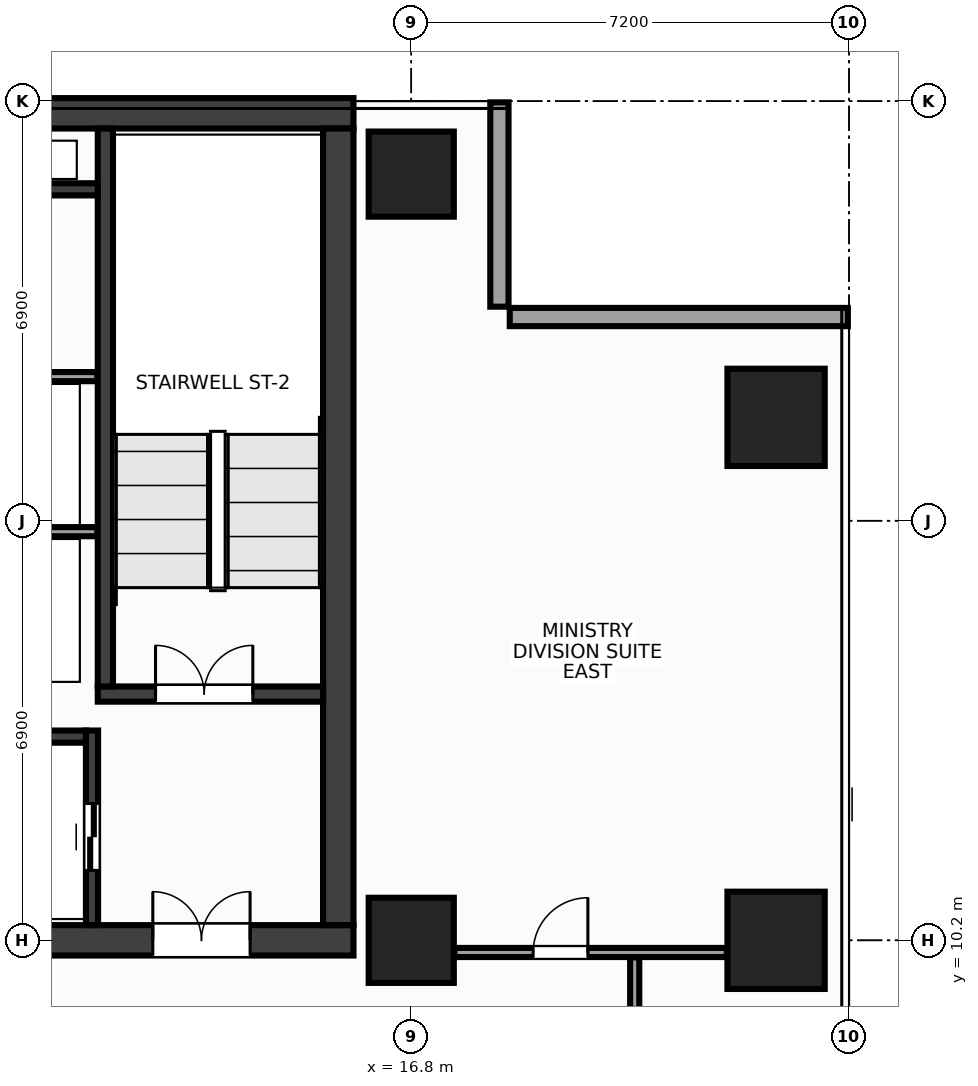
"""IFC4 building model, lengths in metres.
Left out: names, types, materials, properties, quantities, classifications, styles, units other than length and angle.
Written with IfcOpenShell. Run it as: python <this file> out.ifc"""

import sys

from ifc_helpers import new_model, si_unit, direction, frame, frame_2d, origin, origin_2d, place, context, subcontext, project, spatial, rectangle, extrude, source, transform, mapped, element, fill, save


model = new_model("IFC4")
c1 = context("Model", 3, precision=1e-05, world=origin(), true_north=direction((0.0, 1.0)))
c2 = subcontext(c1, "Body", "Model", "MODEL_VIEW")
j1 = project(units=[si_unit("LENGTHUNIT", "METRE"), si_unit("PLANEANGLEUNIT", "RADIAN")], contexts=[c1])
p1 = place(None, origin())
s1 = spatial("IfcSite", under=j1, at=p1, CompositionType="ELEMENT")
p2 = place(p1, origin())
s2 = spatial("IfcBuilding", under=s1, at=p2, CompositionType="ELEMENT")
p3 = place(p2, frame((0.0, 0.0, 214.4)))
s3 = spatial("IfcBuildingStorey", under=s2, at=p3, CompositionType="ELEMENT", Elevation=214.4)
m1 = source(origin(), c2, "Body", "SweptSolid", [
    extrude(rectangle(XDim=31.7, YDim=0.5, at=frame_2d((15.85, 0.0))), origin(), (0.0, 0.0, 1.0), 3.6),
])
p4 = place(p3, frame((-15.85, 23.8, 0.0), z_axis=(0.0, 0.0, 1.0), x_axis=(1.0, 0.0, 0.0)))
e1 = element("IfcWall", 1, at=p4, inside=s3, PredefinedType="SHEAR", context=c2, shape_type="MappedRepresentation", body=[
    mapped(m1, transform((0.0, 0.0, 0.0), x_axis=(1.0, 0.0, 0.0), y_axis=(0.0, 1.0, 0.0), z_axis=(0.0, 0.0, 1.0), scale=1.0)),
])
p5 = place(p3, frame((-15.85, 10.2, 0.0), z_axis=(0.0, 0.0, 1.0), x_axis=(1.0, 0.0, 0.0)))
e2 = element("IfcWall", 2, at=p5, inside=s3, PredefinedType="SHEAR", context=c2, shape_type="MappedRepresentation", body=[
    mapped(m1, transform((0.0, 0.0, 0.0), x_axis=(1.0, 0.0, 0.0), y_axis=(0.0, 1.0, 0.0), z_axis=(0.0, 0.0, 1.0), scale=1.0)),
])
p6 = place(p5, frame((1.7, 0.0, 0.0)))
e3 = element("IfcOpeningElement", 3, at=p6, cuts=e2, PredefinedType="OPENING", context=c2, shape_type="SweptSolid", body=[
    extrude(rectangle(XDim=1.6, YDim=2.15, at=frame_2d((0.8, 1.075))), frame((0.0, 0.262, 0.0), z_axis=(0.0, -1.0, 0.0), x_axis=(1.0, 0.0, 0.0)), (0.0, 0.0, 1.0), 0.524),
])
p7 = place(p5, frame((28.4, 0.0, 0.0)))
e4 = element("IfcOpeningElement", 4, at=p7, cuts=e2, PredefinedType="OPENING", context=c2, shape_type="SweptSolid", body=[
    extrude(rectangle(XDim=1.6, YDim=2.15, at=frame_2d((0.8, 1.075))), frame((0.0, 0.262, 0.0), z_axis=(0.0, -1.0, 0.0), x_axis=(1.0, 0.0, 0.0)), (0.0, 0.0, 1.0), 0.524),
])
p8 = place(p5, frame((15.1, 0.0, 0.0)))
e5 = element("IfcOpeningElement", 5, at=p8, cuts=e2, PredefinedType="OPENING", context=c2, shape_type="SweptSolid", body=[
    extrude(rectangle(XDim=1.5, YDim=2.2, at=frame_2d((0.75, 1.1))), frame((0.0, 0.262, 0.0), z_axis=(0.0, -1.0, 0.0), x_axis=(1.0, 0.0, 0.0)), (0.0, 0.0, 1.0), 0.524),
])
m2 = source(origin(), c2, "Body", "SweptSolid", [
    extrude(rectangle(XDim=13.1, YDim=0.5, at=frame_2d((6.55, 0.0))), origin(), (0.0, 0.0, 1.0), 3.6),
])
p9 = place(p3, frame((15.6, 10.45, 0.0), z_axis=(0.0, 0.0, 1.0), x_axis=(0.0, 1.0, 0.0)))
e6 = element("IfcWall", 6, at=p9, inside=s3, PredefinedType="SHEAR", context=c2, shape_type="MappedRepresentation", body=[
    mapped(m2, transform((0.0, 0.0, 0.0), x_axis=(1.0, 0.0, 0.0), y_axis=(0.0, 1.0, 0.0), z_axis=(0.0, 0.0, 1.0), scale=1.0)),
])
m3 = source(origin(), c2, "Body", "SweptSolid", [
    extrude(rectangle(XDim=3.705, YDim=0.25, at=frame_2d((1.853, 0.0))), origin(), (0.0, 0.0, 1.0), 3.6),
])
p10 = place(p3, frame((11.645, 14.25, 0.0), z_axis=(0.0, 0.0, 1.0), x_axis=(1.0, 0.0, 0.0)))
e7 = element("IfcWall", 7, at=p10, inside=s3, PredefinedType="SHEAR", context=c2, shape_type="MappedRepresentation", body=[
    mapped(m3, transform((0.0, 0.0, 0.0), x_axis=(1.0, 0.0, 0.0), y_axis=(0.0, 1.0, 0.0), z_axis=(0.0, 0.0, 1.0), scale=1.0)),
])
p11 = place(p10, frame((0.95, 0.0, 0.0)))
e8 = element("IfcOpeningElement", 8, at=p11, cuts=e7, PredefinedType="OPENING", context=c2, shape_type="SweptSolid", body=[
    extrude(rectangle(XDim=1.6, YDim=2.15, at=frame_2d((0.8, 1.075))), frame((0.0, 0.137, 0.0), z_axis=(0.0, -1.0, 0.0), x_axis=(1.0, 0.0, 0.0)), (0.0, 0.0, 1.0), 0.274),
])
m4 = source(origin(), c2, "Body", "SweptSolid", [
    extrude(rectangle(XDim=9.175, YDim=0.25, at=frame_2d((4.587, 0.0))), origin(), (0.0, 0.0, 1.0), 3.6),
])
p12 = place(p3, frame((11.77, 14.375, 0.0), z_axis=(0.0, 0.0, 1.0), x_axis=(0.0, 1.0, 0.0)))
e9 = element("IfcWall", 9, at=p12, inside=s3, PredefinedType="SHEAR", context=c2, shape_type="MappedRepresentation", body=[
    mapped(m4, transform((0.0, 0.0, 0.0), x_axis=(1.0, 0.0, 0.0), y_axis=(0.0, 1.0, 0.0), z_axis=(0.0, 0.0, 1.0), scale=1.0)),
])
m5 = source(origin(), c2, "Body", "SweptSolid", [
    extrude(rectangle(XDim=3.2, YDim=0.2, at=frame_2d((1.6, 0.0))), origin(), (0.0, 0.0, 1.0), 3.6),
])
p13 = place(p3, frame((11.55, 10.45, 0.0), z_axis=(0.0, 0.0, 1.0), x_axis=(0.0, 1.0, 0.0)))
e10 = element("IfcWall", 10, at=p13, inside=s3, PredefinedType="SHEAR", context=c2, shape_type="MappedRepresentation", body=[
    mapped(m5, transform((0.0, 0.0, 0.0), x_axis=(1.0, 0.0, 0.0), y_axis=(0.0, 1.0, 0.0), z_axis=(0.0, 0.0, 1.0), scale=1.0)),
])
p14 = place(p13, frame((0.9, 0.0, 0.0)))
e11 = element("IfcOpeningElement", 11, at=p14, cuts=e10, PredefinedType="OPENING", context=c2, shape_type="SweptSolid", body=[
    extrude(rectangle(XDim=1.1, YDim=2.15, at=frame_2d((0.55, 1.075))), frame((0.0, 0.112, 0.0), z_axis=(0.0, -1.0, 0.0), x_axis=(1.0, 0.0, 0.0)), (0.0, 0.0, 1.0), 0.224),
])
m6 = source(origin(), c2, "Body", "SweptSolid", [
    extrude(rectangle(XDim=2.825, YDim=0.2, at=frame_2d((1.413, 0.0))), origin(), (0.0, 0.0, 1.0), 3.6),
])
p15 = place(p3, frame((8.625, 13.55, 0.0), z_axis=(0.0, 0.0, 1.0), x_axis=(1.0, 0.0, 0.0)))
e12 = element("IfcWall", 12, at=p15, inside=s3, PredefinedType="SHEAR", context=c2, shape_type="MappedRepresentation", body=[
    mapped(m6, transform((0.0, 0.0, 0.0), x_axis=(1.0, 0.0, 0.0), y_axis=(0.0, 1.0, 0.0), z_axis=(0.0, 0.0, 1.0), scale=1.0)),
])
m7 = source(origin(), c2, "Body", "SweptSolid", [
    extrude(rectangle(XDim=3.02, YDim=0.2, at=frame_2d((1.51, 0.0))), origin(), (0.0, 0.0, 1.0), 3.6),
])
p16 = place(p3, frame((8.625, 22.55, 0.0), z_axis=(0.0, 0.0, 1.0), x_axis=(1.0, 0.0, 0.0)))
e13 = element("IfcWall", 13, at=p16, inside=s3, PredefinedType="SHEAR", context=c2, shape_type="MappedRepresentation", body=[
    mapped(m7, transform((0.0, 0.0, 0.0), x_axis=(1.0, 0.0, 0.0), y_axis=(0.0, 1.0, 0.0), z_axis=(0.0, 0.0, 1.0), scale=1.0)),
])
m8 = source(origin(), c2, "Body", "SweptSolid", [
    extrude(rectangle(XDim=1.4, YDim=1.4, at=origin_2d()), origin(), (0.0, 0.0, 1.0), 3.6),
])
for number, where, z_axis, x_axis in (
    (14, (16.8, 10.2, 0.0), (0.0, 0.0, 1.0), (1.0, 0.0, 0.0)),
    (15, (16.8, 22.8, 0.0), (0.0, 0.0, 1.0), (1.0, 0.0, 0.0)),
):
    element("IfcColumn", number, at=place(p3, frame(where, z_axis=z_axis, x_axis=x_axis)), inside=s3, PredefinedType="COLUMN", context=c2, shape_type="MappedRepresentation", body=[
        mapped(m8, transform((0.0, 0.0, 0.0), x_axis=(1.0, 0.0, 0.0), y_axis=(0.0, 1.0, 0.0), z_axis=(0.0, 0.0, 1.0), scale=1.0)),
    ])
m9 = source(origin(), c2, "Body", "SweptSolid", [
    extrude(rectangle(XDim=1.6, YDim=1.6, at=origin_2d()), origin(), (0.0, 0.0, 1.0), 3.6),
])
for number, where, z_axis, x_axis in (
    (16, (22.8, 10.2, 0.0), (0.0, 0.0, 1.0), (1.0, 0.0, 0.0)),
    (17, (22.8, 18.8, 0.0), (0.0, 0.0, 1.0), (1.0, 0.0, 0.0)),
):
    element("IfcColumn", number, at=place(p3, frame(where, z_axis=z_axis, x_axis=x_axis)), inside=s3, PredefinedType="COLUMN", context=c2, shape_type="MappedRepresentation", body=[
        mapped(m9, transform((0.0, 0.0, 0.0), x_axis=(1.0, 0.0, 0.0), y_axis=(0.0, 1.0, 0.0), z_axis=(0.0, 0.0, 1.0), scale=1.0)),
    ])
m10 = source(origin(), c2, "Body", "SweptSolid", [
    extrude(rectangle(XDim=5.56, YDim=0.3, at=frame_2d((2.78, 0.0))), origin(), (0.0, 0.0, 1.0), 2.76),
])
p17 = place(p3, frame((23.98, 20.45, 0.0), z_axis=(0.0, 0.0, 1.0), x_axis=(-1.0, 0.0, 0.0)))
e18 = element("IfcWall", 18, at=p17, inside=s3, PredefinedType="STANDARD", context=c2, shape_type="MappedRepresentation", body=[
    mapped(m10, transform((0.0, 0.0, 0.0), x_axis=(1.0, 0.0, 0.0), y_axis=(0.0, 1.0, 0.0), z_axis=(0.0, 0.0, 1.0), scale=1.0)),
])
m11 = source(origin(), c2, "Body", "SweptSolid", [
    extrude(rectangle(XDim=3.36, YDim=0.3, at=frame_2d((1.68, 0.0))), origin(), (0.0, 0.0, 1.0), 2.76),
])
p18 = place(p3, frame((18.25, 20.62, 0.0), z_axis=(0.0, 0.0, 1.0), x_axis=(0.0, 1.0, 0.0)))
e19 = element("IfcWall", 19, at=p18, inside=s3, PredefinedType="STANDARD", context=c2, shape_type="MappedRepresentation", body=[
    mapped(m11, transform((0.0, 0.0, 0.0), x_axis=(1.0, 0.0, 0.0), y_axis=(0.0, 1.0, 0.0), z_axis=(0.0, 0.0, 1.0), scale=1.0)),
])
m12 = source(origin(), c2, "Body", "SweptSolid", [
    extrude(rectangle(XDim=3.01, YDim=0.15, at=frame_2d((1.505, 0.0))), origin(), (0.0, 0.0, 1.0), 3.38),
])
for number, where, z_axis, x_axis in (
    (20, (8.63, 16.92, 0.0), (0.0, 0.0, 1.0), (1.0, 0.0, 0.0)),
    (21, (8.63, 19.47, 0.0), (0.0, 0.0, 1.0), (1.0, 0.0, 0.0)),
):
    element("IfcWall", number, at=place(p3, frame(where, z_axis=z_axis, x_axis=x_axis)), inside=s3, PredefinedType="PARTITIONING", context=c2, shape_type="MappedRepresentation", body=[
        mapped(m12, transform((0.0, 0.0, 0.0), x_axis=(1.0, 0.0, 0.0), y_axis=(0.0, 1.0, 0.0), z_axis=(0.0, 0.0, 1.0), scale=1.0)),
    ])
m13 = source(origin(), c2, "Body", "SweptSolid", [
    extrude(rectangle(XDim=4.48, YDim=0.15, at=frame_2d((2.24, 0.0))), origin(), (0.0, 0.0, 1.0), 2.915),
])
p19 = place(p3, frame((17.51, 10.0, 0.0), z_axis=(0.0, 0.0, 1.0), x_axis=(1.0, 0.0, 0.0)))
e22 = element("IfcWall", 22, at=p19, inside=s3, PredefinedType="PARTITIONING", context=c2, shape_type="MappedRepresentation", body=[
    mapped(m13, transform((0.0, 0.0, 0.0), x_axis=(1.0, 0.0, 0.0), y_axis=(0.0, 1.0, 0.0), z_axis=(0.0, 0.0, 1.0), scale=1.0)),
])
p20 = place(p19, frame((1.295, 0.0, 0.0)))
e23 = element("IfcOpeningElement", 23, at=p20, cuts=e22, PredefinedType="OPENING", context=c2, shape_type="SweptSolid", body=[
    extrude(rectangle(XDim=0.9, YDim=2.15, at=frame_2d((0.45, 1.075))), frame((0.0, 0.087, 0.0), z_axis=(0.0, -1.0, 0.0), x_axis=(1.0, 0.0, 0.0)), (0.0, 0.0, 1.0), 0.174),
])
m14 = source(origin(), c2, "Body", "SweptSolid", [
    extrude(rectangle(XDim=2.365, YDim=0.15, at=frame_2d((1.183, 0.0))), origin(), (0.0, 0.0, 1.0), 3.38),
])
p21 = place(p3, frame((20.475, 7.555, 0.0), z_axis=(0.0, 0.0, 1.0), x_axis=(0.0, 1.0, 0.0)))
e24 = element("IfcWall", 24, at=p21, inside=s3, PredefinedType="PARTITIONING", context=c2, shape_type="MappedRepresentation", body=[
    mapped(m14, transform((0.0, 0.0, 0.0), x_axis=(1.0, 0.0, 0.0), y_axis=(0.0, 1.0, 0.0), z_axis=(0.0, 0.0, 1.0), scale=1.0)),
])
m15 = source(origin(), c2, "Body", "SweptSolid", [
    extrude(rectangle(XDim=1.6, YDim=2.15, at=frame_2d((0.8, 1.075))), frame((0.0, 0.025, 0.0), z_axis=(0.0, -1.0, 0.0), x_axis=(1.0, 0.0, 0.0)), (0.0, 0.0, 1.0), 0.05),
])
p22 = place(p11, origin())
e25 = element("IfcDoor", 25, at=p22, inside=s3, OperationType="DOUBLE_DOOR_SINGLE_SWING", PredefinedType="DOOR", context=c2, shape_type="MappedRepresentation", body=[
    mapped(m15, transform((0.0, 0.0, 0.0), x_axis=(1.0, 0.0, 0.0), y_axis=(0.0, 1.0, 0.0), z_axis=(0.0, 0.0, 1.0), scale=1.0)),
])
fill(e8, e25)
p23 = place(p7, origin())
e26 = element("IfcDoor", 26, at=p23, inside=s3, OperationType="DOUBLE_DOOR_SINGLE_SWING", PredefinedType="DOOR", context=c2, shape_type="MappedRepresentation", body=[
    mapped(m15, transform((0.0, 0.0, 0.0), x_axis=(1.0, 0.0, 0.0), y_axis=(0.0, 1.0, 0.0), z_axis=(0.0, 0.0, 1.0), scale=1.0)),
])
fill(e4, e26)
m16 = source(origin(), c2, "Body", "SweptSolid", [
    extrude(rectangle(XDim=1.1, YDim=2.15, at=frame_2d((0.55, 1.075))), frame((0.0, 0.025, 0.0), z_axis=(0.0, -1.0, 0.0), x_axis=(1.0, 0.0, 0.0)), (0.0, 0.0, 1.0), 0.05),
])
p24 = place(p14, origin())
e27 = element("IfcDoor", 27, at=p24, inside=s3, OperationType="DOUBLE_DOOR_SLIDING", PredefinedType="DOOR", context=c2, shape_type="MappedRepresentation", body=[
    mapped(m16, transform((0.0, 0.0, 0.0), x_axis=(1.0, 0.0, 0.0), y_axis=(0.0, 1.0, 0.0), z_axis=(0.0, 0.0, 1.0), scale=1.0)),
])
fill(e11, e27)
m17 = source(origin(), c2, "Body", "SweptSolid", [
    extrude(rectangle(XDim=0.9, YDim=2.15, at=frame_2d((0.45, 1.075))), frame((0.0, 0.025, 0.0), z_axis=(0.0, -1.0, 0.0), x_axis=(1.0, 0.0, 0.0)), (0.0, 0.0, 1.0), 0.05),
])
p25 = place(p20, origin())
e28 = element("IfcDoor", 28, at=p25, inside=s3, OperationType="SINGLE_SWING_RIGHT", PredefinedType="DOOR", context=c2, shape_type="MappedRepresentation", body=[
    mapped(m17, transform((0.0, 0.0, 0.0), x_axis=(1.0, 0.0, 0.0), y_axis=(0.0, 1.0, 0.0), z_axis=(0.0, 0.0, 1.0), scale=1.0)),
])
fill(e23, e28)
save(model, sys.argv[1])
